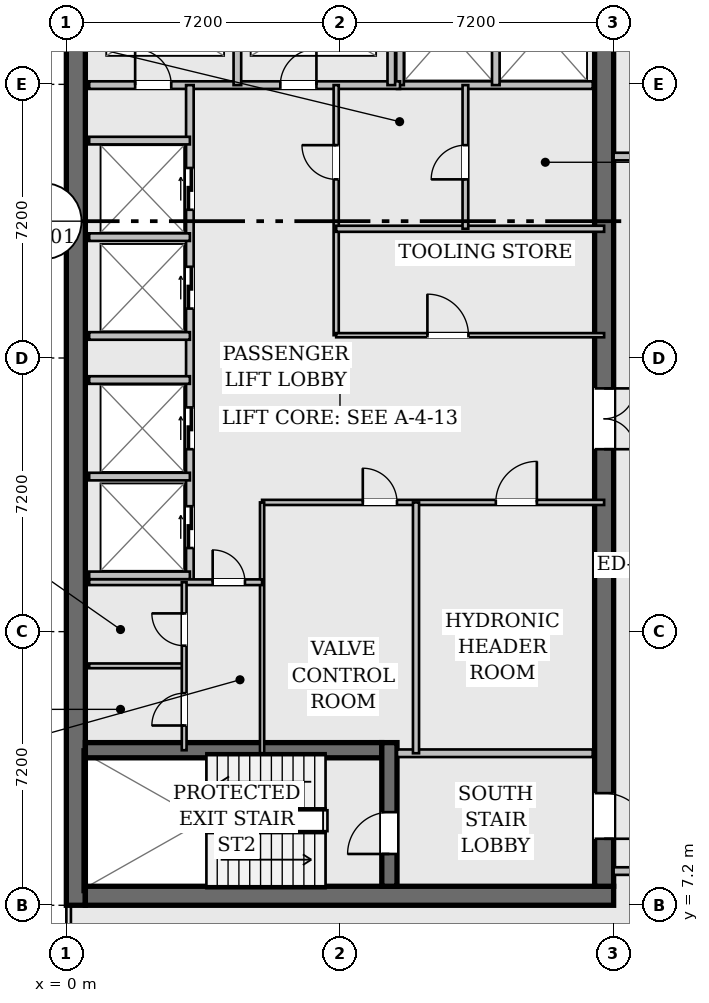
"""IFC4 building model, lengths in metres.
Left out: names, types, materials, properties, quantities, classifications, styles, units other than length and angle.
Written with IfcOpenShell. Run it as: python <this file> out.ifc"""

import sys

from ifc_helpers import new_model, si_unit, direction, frame, frame_2d, origin, place, context, subcontext, project, spatial, rectangle, extrude, element, fill, save


model = new_model("IFC4")
c1 = context("Model", 3, precision=1e-05, world=origin(), true_north=direction((0.0, 1.0)))
c2 = subcontext(c1, "Body", "Model", "MODEL_VIEW")
j1 = project(units=[si_unit("LENGTHUNIT", "METRE"), si_unit("PLANEANGLEUNIT", "RADIAN")], contexts=[c1])
p1 = place(None, origin())
s1 = spatial("IfcSite", under=j1, at=p1, CompositionType="ELEMENT")
p2 = place(p1, origin())
s2 = spatial("IfcBuilding", under=s1, at=p2, CompositionType="ELEMENT")
p3 = place(p2, frame((0.0, 0.0, 236.95)))
s3 = spatial("IfcBuildingStorey", under=s2, at=p3, CompositionType="ELEMENT", Elevation=236.95)
p4 = place(p3, frame((0.25, 7.2, 0.0), z_axis=(0.0, 0.0, 1.0), x_axis=(0.0, 1.0, 0.0)))
e1 = element("IfcWall", 1, at=p4, inside=s3, PredefinedType="SHEAR", context=c2, shape_type="SweptSolid", body=[
    extrude(rectangle(XDim=28.8, YDim=0.5, at=frame_2d((14.4, 0.0))), origin(), (0.0, 0.0, 1.0), 3.94),
])
p5 = place(p3, frame((0.5, 7.45, 0.0), z_axis=(0.0, 0.0, 1.0), x_axis=(1.0, 0.0, 0.0)))
e2 = element("IfcWall", 2, at=p5, inside=s3, PredefinedType="SHEAR", context=c2, shape_type="SweptSolid", body=[
    extrude(rectangle(XDim=13.9, YDim=0.5, at=frame_2d((6.95, 0.0))), origin(), (0.0, 0.0, 1.0), 3.94),
])
p6 = place(p3, frame((14.15, 35.5, 0.0), z_axis=(0.0, 0.0, 1.0), x_axis=(0.0, -1.0, 0.0)))
e3 = element("IfcWall", 3, at=p6, inside=s3, PredefinedType="SHEAR", context=c2, shape_type="SweptSolid", body=[
    extrude(rectangle(XDim=27.8, YDim=0.5, at=frame_2d((13.9, 0.0))), origin(), (0.0, 0.0, 1.0), 3.94),
])
p7 = place(p6, frame((1.4, 0.0, 0.0)))
e4 = element("IfcOpeningElement", 4, at=p7, cuts=e3, PredefinedType="OPENING", context=c2, shape_type="SweptSolid", body=[
    extrude(rectangle(XDim=1.2, YDim=2.15, at=frame_2d((0.6, 1.075))), frame((0.0, 0.262, 0.0), z_axis=(0.0, -1.0, 0.0), x_axis=(1.0, 0.0, 0.0)), (0.0, 0.0, 1.0), 0.524),
])
p8 = place(p6, frame((25.35, 0.0, 0.0)))
e5 = element("IfcOpeningElement", 5, at=p8, cuts=e3, PredefinedType="OPENING", context=c2, shape_type="SweptSolid", body=[
    extrude(rectangle(XDim=1.2, YDim=2.15, at=frame_2d((0.6, 1.075))), frame((0.0, 0.262, 0.0), z_axis=(0.0, -1.0, 0.0), x_axis=(1.0, 0.0, 0.0)), (0.0, 0.0, 1.0), 0.524),
])
p9 = place(p6, frame((14.7, 0.0, 0.0)))
e6 = element("IfcOpeningElement", 6, at=p9, cuts=e3, PredefinedType="OPENING", context=c2, shape_type="SweptSolid", body=[
    extrude(rectangle(XDim=1.6, YDim=2.2, at=frame_2d((0.8, 1.1))), frame((0.0, 0.262, 0.0), z_axis=(0.0, -1.0, 0.0), x_axis=(1.0, 0.0, 0.0)), (0.0, 0.0, 1.0), 0.524),
])
p10 = place(p3, frame((0.5, 11.28, 0.0), z_axis=(0.0, 0.0, 1.0), x_axis=(1.0, 0.0, 0.0)))
e7 = element("IfcWall", 7, at=p10, inside=s3, PredefinedType="SHEAR", context=c2, shape_type="SweptSolid", body=[
    extrude(rectangle(XDim=7.8, YDim=0.4, at=frame_2d((3.9, 0.0))), origin(), (0.0, 0.0, 1.0), 3.94),
])
p11 = place(p3, frame((8.5, 7.7, 0.0), z_axis=(0.0, 0.0, 1.0), x_axis=(0.0, 1.0, 0.0)))
e8 = element("IfcWall", 8, at=p11, inside=s3, PredefinedType="SHEAR", context=c2, shape_type="SweptSolid", body=[
    extrude(rectangle(XDim=3.78, YDim=0.4, at=frame_2d((1.89, 0.0))), origin(), (0.0, 0.0, 1.0), 3.94),
])
p12 = place(p11, frame((0.85, 0.0, 0.0)))
e9 = element("IfcOpeningElement", 9, at=p12, cuts=e8, PredefinedType="OPENING", context=c2, shape_type="SweptSolid", body=[
    extrude(rectangle(XDim=1.1, YDim=2.15, at=frame_2d((0.55, 1.075))), frame((0.0, 0.212, 0.0), z_axis=(0.0, -1.0, 0.0), x_axis=(1.0, 0.0, 0.0)), (0.0, 0.0, 1.0), 0.424),
])
for number, where, z_axis, x_axis in (
    (10, (8.7, 11.2, 0.0), (0.0, 0.0, 1.0), (1.0, 0.0, 0.0)),
    (11, (8.7, 28.78, 0.0), (0.0, 0.0, 1.0), (1.0, 0.0, 0.0)),
):
    element("IfcWall", number, at=place(p3, frame(where, z_axis=z_axis, x_axis=x_axis)), inside=s3, PredefinedType="PARTITIONING", context=c2, shape_type="SweptSolid", body=[
        extrude(rectangle(XDim=5.15, YDim=0.2, at=frame_2d((2.575, 0.0))), origin(), (0.0, 0.0, 1.0), 3.94),
    ])
for number, where, z_axis, x_axis in (
    (12, (8.78, 28.78, 0.0), (0.0, 0.0, 1.0), (0.0, 1.0, 0.0)),
    (13, (11.3, 28.78, 0.0), (0.0, 0.0, 1.0), (0.0, 1.0, 0.0)),
):
    element("IfcWall", number, at=place(p3, frame(where, z_axis=z_axis, x_axis=x_axis)), inside=s3, PredefinedType="PARTITIONING", context=c2, shape_type="SweptSolid", body=[
        extrude(rectangle(XDim=3.1, YDim=0.2, at=frame_2d((1.55, 0.0))), origin(), (0.0, 0.0, 1.0), 3.94),
    ])
p13 = place(p3, frame((0.6, 28.78, 0.0), z_axis=(0.0, 0.0, 1.0), x_axis=(1.0, 0.0, 0.0)))
e14 = element("IfcWall", 14, at=p13, inside=s3, PredefinedType="PARTITIONING", context=c2, shape_type="SweptSolid", body=[
    extrude(rectangle(XDim=8.18, YDim=0.2, at=frame_2d((4.09, 0.0))), origin(), (0.0, 0.0, 1.0), 3.94),
])
p14 = place(p13, frame((1.21, 0.0, 0.0)))
e15 = element("IfcOpeningElement", 15, at=p14, cuts=e14, PredefinedType="OPENING", context=c2, shape_type="SweptSolid", body=[
    extrude(rectangle(XDim=0.95, YDim=2.15, at=frame_2d((0.475, 1.075))), frame((0.0, 0.112, 0.0), z_axis=(0.0, -1.0, 0.0), x_axis=(1.0, 0.0, 0.0)), (0.0, 0.0, 1.0), 0.224),
])
p15 = place(p13, frame((5.03, 0.0, 0.0)))
e16 = element("IfcOpeningElement", 16, at=p15, cuts=e14, PredefinedType="OPENING", context=c2, shape_type="SweptSolid", body=[
    extrude(rectangle(XDim=0.95, YDim=2.15, at=frame_2d((0.475, 1.075))), frame((0.0, 0.112, 0.0), z_axis=(0.0, -1.0, 0.0), x_axis=(1.0, 0.0, 0.0)), (0.0, 0.0, 1.0), 0.224),
])
for number, where, z_axis, x_axis in (
    (17, (4.5, 28.78, 0.0), (0.0, 0.0, 1.0), (0.0, 1.0, 0.0)),
    (18, (8.55, 28.78, 0.0), (0.0, 0.0, 1.0), (0.0, 1.0, 0.0)),
):
    element("IfcWall", number, at=place(p3, frame(where, z_axis=z_axis, x_axis=x_axis)), inside=s3, PredefinedType="PARTITIONING", context=c2, shape_type="SweptSolid", body=[
        extrude(rectangle(XDim=2.94, YDim=0.2, at=frame_2d((1.47, 0.0))), origin(), (0.0, 0.0, 1.0), 3.94),
    ])
p16 = place(p3, frame((3.25, 15.7, 0.0), z_axis=(0.0, 0.0, 1.0), x_axis=(0.0, 1.0, 0.0)))
e19 = element("IfcWall", 19, at=p16, inside=s3, PredefinedType="PARTITIONING", context=c2, shape_type="SweptSolid", body=[
    extrude(rectangle(XDim=13.08, YDim=0.2, at=frame_2d((6.54, 0.0))), origin(), (0.0, 0.0, 1.0), 3.94),
])
p17 = place(p16, frame((0.9, 0.0, 0.0)))
e20 = element("IfcOpeningElement", 20, at=p17, cuts=e19, PredefinedType="OPENING", context=c2, shape_type="SweptSolid", body=[
    extrude(rectangle(XDim=1.1, YDim=2.2, at=frame_2d((0.55, 1.1))), frame((0.0, 0.112, 0.0), z_axis=(0.0, -1.0, 0.0), x_axis=(1.0, 0.0, 0.0)), (0.0, 0.0, 1.0), 0.224),
])
p18 = place(p16, frame((3.5, 0.0, 0.0)))
e21 = element("IfcOpeningElement", 21, at=p18, cuts=e19, PredefinedType="OPENING", context=c2, shape_type="SweptSolid", body=[
    extrude(rectangle(XDim=1.1, YDim=2.2, at=frame_2d((0.55, 1.1))), frame((0.0, 0.112, 0.0), z_axis=(0.0, -1.0, 0.0), x_axis=(1.0, 0.0, 0.0)), (0.0, 0.0, 1.0), 0.224),
])
p19 = place(p16, frame((7.2, 0.0, 0.0)))
e22 = element("IfcOpeningElement", 22, at=p19, cuts=e19, PredefinedType="OPENING", context=c2, shape_type="SweptSolid", body=[
    extrude(rectangle(XDim=1.1, YDim=2.2, at=frame_2d((0.55, 1.1))), frame((0.0, 0.112, 0.0), z_axis=(0.0, -1.0, 0.0), x_axis=(1.0, 0.0, 0.0)), (0.0, 0.0, 1.0), 0.224),
])
p20 = place(p16, frame((9.8, 0.0, 0.0)))
e23 = element("IfcOpeningElement", 23, at=p20, cuts=e19, PredefinedType="OPENING", context=c2, shape_type="SweptSolid", body=[
    extrude(rectangle(XDim=1.1, YDim=2.2, at=frame_2d((0.55, 1.1))), frame((0.0, 0.112, 0.0), z_axis=(0.0, -1.0, 0.0), x_axis=(1.0, 0.0, 0.0)), (0.0, 0.0, 1.0), 0.224),
])
for number, where, z_axis, x_axis in (
    (24, (0.6, 15.88, 0.0), (0.0, 0.0, 1.0), (1.0, 0.0, 0.0)),
    (25, (0.6, 18.48, 0.0), (0.0, 0.0, 1.0), (1.0, 0.0, 0.0)),
    (26, (0.6, 22.18, 0.0), (0.0, 0.0, 1.0), (1.0, 0.0, 0.0)),
    (27, (0.6, 24.78, 0.0), (0.0, 0.0, 1.0), (1.0, 0.0, 0.0)),
    (28, (0.6, 21.02, 0.0), (0.0, 0.0, 1.0), (1.0, 0.0, 0.0)),
    (29, (0.6, 27.32, 0.0), (0.0, 0.0, 1.0), (1.0, 0.0, 0.0)),
):
    element("IfcWall", number, at=place(p3, frame(where, z_axis=z_axis, x_axis=x_axis)), inside=s3, PredefinedType="PARTITIONING", context=c2, shape_type="SweptSolid", body=[
        extrude(rectangle(XDim=2.65, YDim=0.2, at=frame_2d((1.325, 0.0))), origin(), (0.0, 0.0, 1.0), 3.94),
    ])
p21 = place(p3, frame((7.1, 22.2, 0.0), z_axis=(0.0, 0.0, 1.0), x_axis=(0.0, 1.0, 0.0)))
e30 = element("IfcWall", 30, at=p21, inside=s3, PredefinedType="PARTITIONING", context=c2, shape_type="SweptSolid", body=[
    extrude(rectangle(XDim=6.58, YDim=0.135, at=frame_2d((3.29, 0.0))), origin(), (0.0, 0.0, 1.0), 3.94),
])
p22 = place(p21, frame((4.1, 0.0, 0.0)))
e31 = element("IfcOpeningElement", 31, at=p22, cuts=e30, PredefinedType="OPENING", context=c2, shape_type="SweptSolid", body=[
    extrude(rectangle(XDim=0.9, YDim=2.15, at=frame_2d((0.45, 1.075))), frame((0.0, 0.08, 0.0), z_axis=(0.0, -1.0, 0.0), x_axis=(1.0, 0.0, 0.0)), (0.0, 0.0, 1.0), 0.159),
])
p23 = place(p3, frame((7.1, 22.2, 0.0), z_axis=(0.0, 0.0, 1.0), x_axis=(1.0, 0.0, 0.0)))
e32 = element("IfcWall", 32, at=p23, inside=s3, PredefinedType="PARTITIONING", context=c2, shape_type="SweptSolid", body=[
    extrude(rectangle(XDim=7.05, YDim=0.11, at=frame_2d((3.525, 0.0))), origin(), (0.0, 0.0, 1.0), 3.94),
])
p24 = place(p23, frame((2.4, 0.0, 0.0)))
e33 = element("IfcOpeningElement", 33, at=p24, cuts=e32, PredefinedType="OPENING", context=c2, shape_type="SweptSolid", body=[
    extrude(rectangle(XDim=1.08, YDim=2.15, at=frame_2d((0.54, 1.075))), frame((0.0, 0.067, 0.0), z_axis=(0.0, -1.0, 0.0), x_axis=(1.0, 0.0, 0.0)), (0.0, 0.0, 1.0), 0.134),
])
p25 = place(p3, frame((7.1, 25.0, 0.0), z_axis=(0.0, 0.0, 1.0), x_axis=(1.0, 0.0, 0.0)))
e34 = element("IfcWall", 34, at=p25, inside=s3, PredefinedType="PARTITIONING", context=c2, shape_type="SweptSolid", body=[
    extrude(rectangle(XDim=7.05, YDim=0.16, at=frame_2d((3.525, 0.0))), origin(), (0.0, 0.0, 1.0), 3.94),
])
p26 = place(p3, frame((10.5, 25.0, 0.0), z_axis=(0.0, 0.0, 1.0), x_axis=(0.0, 1.0, 0.0)))
e35 = element("IfcWall", 35, at=p26, inside=s3, PredefinedType="PARTITIONING", context=c2, shape_type="SweptSolid", body=[
    extrude(rectangle(XDim=3.78, YDim=0.15, at=frame_2d((1.89, 0.0))), origin(), (0.0, 0.0, 1.0), 3.94),
])
p27 = place(p26, frame((1.3, 0.0, 0.0)))
e36 = element("IfcOpeningElement", 36, at=p27, cuts=e35, PredefinedType="OPENING", context=c2, shape_type="SweptSolid", body=[
    extrude(rectangle(XDim=0.9, YDim=2.15, at=frame_2d((0.45, 1.075))), frame((0.0, 0.087, 0.0), z_axis=(0.0, -1.0, 0.0), x_axis=(1.0, 0.0, 0.0)), (0.0, 0.0, 1.0), 0.174),
])
p28 = place(p3, frame((5.15, 17.8, 0.0), z_axis=(0.0, 0.0, 1.0), x_axis=(1.0, 0.0, 0.0)))
e37 = element("IfcWall", 37, at=p28, inside=s3, PredefinedType="PARTITIONING", context=c2, shape_type="SweptSolid", body=[
    extrude(rectangle(XDim=9.0, YDim=0.135, at=frame_2d((4.5, 0.0))), origin(), (0.0, 0.0, 1.0), 3.94),
])
p29 = place(p28, frame((2.65, 0.0, 0.0)))
e38 = element("IfcOpeningElement", 38, at=p29, cuts=e37, PredefinedType="OPENING", context=c2, shape_type="SweptSolid", body=[
    extrude(rectangle(XDim=0.9, YDim=2.15, at=frame_2d((0.45, 1.075))), frame((0.0, 0.08, 0.0), z_axis=(0.0, -1.0, 0.0), x_axis=(1.0, 0.0, 0.0)), (0.0, 0.0, 1.0), 0.159),
])
p30 = place(p28, frame((6.15, 0.0, 0.0)))
e39 = element("IfcOpeningElement", 39, at=p30, cuts=e37, PredefinedType="OPENING", context=c2, shape_type="SweptSolid", body=[
    extrude(rectangle(XDim=1.08, YDim=2.15, at=frame_2d((0.54, 1.075))), frame((0.0, 0.08, 0.0), z_axis=(0.0, -1.0, 0.0), x_axis=(1.0, 0.0, 0.0)), (0.0, 0.0, 1.0), 0.159),
])
p31 = place(p3, frame((5.15, 11.2, 0.0), z_axis=(0.0, 0.0, 1.0), x_axis=(0.0, 1.0, 0.0)))
e40 = element("IfcWall", 40, at=p31, inside=s3, PredefinedType="PARTITIONING", context=c2, shape_type="SweptSolid", body=[
    extrude(rectangle(XDim=6.6, YDim=0.11, at=frame_2d((3.3, 0.0))), origin(), (0.0, 0.0, 1.0), 3.94),
])
p32 = place(p3, frame((9.2, 11.2, 0.0), z_axis=(0.0, 0.0, 1.0), x_axis=(0.0, 1.0, 0.0)))
e41 = element("IfcWall", 41, at=p32, inside=s3, PredefinedType="PARTITIONING", context=c2, shape_type="SweptSolid", body=[
    extrude(rectangle(XDim=6.6, YDim=0.16, at=frame_2d((3.3, 0.0))), origin(), (0.0, 0.0, 1.0), 3.94),
])
p33 = place(p3, frame((0.6, 15.7, 0.0), z_axis=(0.0, 0.0, 1.0), x_axis=(1.0, 0.0, 0.0)))
e42 = element("IfcWall", 42, at=p33, inside=s3, PredefinedType="PARTITIONING", context=c2, shape_type="SweptSolid", body=[
    extrude(rectangle(XDim=4.55, YDim=0.15, at=frame_2d((2.275, 0.0))), origin(), (0.0, 0.0, 1.0), 3.94),
])
p34 = place(p33, frame((3.25, 0.0, 0.0)))
e43 = element("IfcOpeningElement", 43, at=p34, cuts=e42, PredefinedType="OPENING", context=c2, shape_type="SweptSolid", body=[
    extrude(rectangle(XDim=0.85, YDim=2.15, at=frame_2d((0.425, 1.075))), frame((0.0, 0.087, 0.0), z_axis=(0.0, -1.0, 0.0), x_axis=(1.0, 0.0, 0.0)), (0.0, 0.0, 1.0), 0.174),
])
p35 = place(p3, frame((0.6, 13.5, 0.0), z_axis=(0.0, 0.0, 1.0), x_axis=(1.0, 0.0, 0.0)))
e44 = element("IfcWall", 44, at=p35, inside=s3, PredefinedType="PARTITIONING", context=c2, shape_type="SweptSolid", body=[
    extrude(rectangle(XDim=2.5, YDim=0.125, at=frame_2d((1.25, 0.0))), origin(), (0.0, 0.0, 1.0), 3.94),
])
p36 = place(p3, frame((3.1, 11.28, 0.0), z_axis=(0.0, 0.0, 1.0), x_axis=(0.0, 1.0, 0.0)))
e45 = element("IfcWall", 45, at=p36, inside=s3, PredefinedType="PARTITIONING", context=c2, shape_type="SweptSolid", body=[
    extrude(rectangle(XDim=4.42, YDim=0.125, at=frame_2d((2.21, 0.0))), origin(), (0.0, 0.0, 1.0), 3.94),
])
p37 = place(p36, frame((0.65, 0.0, 0.0)))
e46 = element("IfcOpeningElement", 46, at=p37, cuts=e45, PredefinedType="OPENING", context=c2, shape_type="SweptSolid", body=[
    extrude(rectangle(XDim=0.85, YDim=2.15, at=frame_2d((0.425, 1.075))), frame((0.0, 0.074, 0.0), z_axis=(0.0, -1.0, 0.0), x_axis=(1.0, 0.0, 0.0)), (0.0, 0.0, 1.0), 0.149),
])
p38 = place(p36, frame((2.75, 0.0, 0.0)))
e47 = element("IfcOpeningElement", 47, at=p38, cuts=e45, PredefinedType="OPENING", context=c2, shape_type="SweptSolid", body=[
    extrude(rectangle(XDim=0.85, YDim=2.15, at=frame_2d((0.425, 1.075))), frame((0.0, 0.074, 0.0), z_axis=(0.0, -1.0, 0.0), x_axis=(1.0, 0.0, 0.0)), (0.0, 0.0, 1.0), 0.149),
])
p39 = place(p3, frame((14.4, 26.9, 0.0), z_axis=(0.0, 0.0, 1.0), x_axis=(1.0, 0.0, 0.0)))
e48 = element("IfcWall", 48, at=p39, inside=s3, PredefinedType="PARTITIONING", context=c2, shape_type="SweptSolid", body=[
    extrude(rectangle(XDim=2.95, YDim=0.2, at=frame_2d((1.475, 0.0))), origin(), (0.0, 0.0, 1.0), 3.508),
])
p40 = place(p39, frame((0.95, 0.0, 0.0)))
e49 = element("IfcOpeningElement", 49, at=p40, cuts=e48, PredefinedType="OPENING", context=c2, shape_type="SweptSolid", body=[
    extrude(rectangle(XDim=1.1, YDim=2.15, at=frame_2d((0.55, 1.075))), frame((0.0, 0.112, 0.0), z_axis=(0.0, -1.0, 0.0), x_axis=(1.0, 0.0, 0.0)), (0.0, 0.0, 1.0), 0.224),
])
p41 = place(p3, frame((14.4, 8.1, 0.0), z_axis=(0.0, 0.0, 1.0), x_axis=(1.0, 0.0, 0.0)))
e50 = element("IfcWall", 50, at=p41, inside=s3, PredefinedType="PARTITIONING", context=c2, shape_type="SweptSolid", body=[
    extrude(rectangle(XDim=2.95, YDim=0.2, at=frame_2d((1.475, 0.0))), origin(), (0.0, 0.0, 1.0), 3.94),
])
p42 = place(p12, origin())
e51 = element("IfcDoor", 51, at=p42, inside=s3, OperationType="SINGLE_SWING_LEFT", PredefinedType="DOOR", context=c2, shape_type="SweptSolid", body=[
    extrude(rectangle(XDim=1.1, YDim=2.15, at=frame_2d((0.55, 1.075))), frame((0.0, 0.025, 0.0), z_axis=(0.0, -1.0, 0.0), x_axis=(1.0, 0.0, 0.0)), (0.0, 0.0, 1.0), 0.05),
])
fill(e9, e51)
p43 = place(p8, origin())
e52 = element("IfcDoor", 52, at=p43, inside=s3, OperationType="SINGLE_SWING_RIGHT", PredefinedType="DOOR", context=c2, shape_type="SweptSolid", body=[
    extrude(rectangle(XDim=1.2, YDim=2.15, at=frame_2d((0.6, 1.075))), frame((0.0, 0.025, 0.0), z_axis=(0.0, -1.0, 0.0), x_axis=(1.0, 0.0, 0.0)), (0.0, 0.0, 1.0), 0.05),
])
fill(e5, e52)
p44 = place(p14, origin())
e53 = element("IfcDoor", 53, at=p44, inside=s3, OperationType="SINGLE_SWING_LEFT", PredefinedType="DOOR", context=c2, shape_type="SweptSolid", body=[
    extrude(rectangle(XDim=0.95, YDim=2.15, at=frame_2d((0.475, 1.075))), frame((0.0, 0.025, 0.0), z_axis=(0.0, -1.0, 0.0), x_axis=(1.0, 0.0, 0.0)), (0.0, 0.0, 1.0), 0.05),
])
fill(e15, e53)
p45 = place(p15, origin())
e54 = element("IfcDoor", 54, at=p45, inside=s3, OperationType="SINGLE_SWING_RIGHT", PredefinedType="DOOR", context=c2, shape_type="SweptSolid", body=[
    extrude(rectangle(XDim=0.95, YDim=2.15, at=frame_2d((0.475, 1.075))), frame((0.0, 0.025, 0.0), z_axis=(0.0, -1.0, 0.0), x_axis=(1.0, 0.0, 0.0)), (0.0, 0.0, 1.0), 0.05),
])
fill(e16, e54)
p46 = place(p9, origin())
e55 = element("IfcDoor", 55, at=p46, inside=s3, OperationType="DOUBLE_DOOR_SINGLE_SWING", PredefinedType="DOOR", context=c2, shape_type="SweptSolid", body=[
    extrude(rectangle(XDim=1.6, YDim=2.2, at=frame_2d((0.8, 1.1))), frame((0.0, 0.025, 0.0), z_axis=(0.0, -1.0, 0.0), x_axis=(1.0, 0.0, 0.0)), (0.0, 0.0, 1.0), 0.05),
])
fill(e6, e55)
p47 = place(p17, origin())
e56 = element("IfcDoor", 56, at=p47, inside=s3, OperationType="DOUBLE_DOOR_SLIDING", PredefinedType="DOOR", context=c2, shape_type="SweptSolid", body=[
    extrude(rectangle(XDim=1.1, YDim=2.2, at=frame_2d((0.55, 1.1))), frame((0.0, 0.025, 0.0), z_axis=(0.0, -1.0, 0.0), x_axis=(1.0, 0.0, 0.0)), (0.0, 0.0, 1.0), 0.05),
])
fill(e20, e56)
p48 = place(p18, origin())
e57 = element("IfcDoor", 57, at=p48, inside=s3, OperationType="DOUBLE_DOOR_SLIDING", PredefinedType="DOOR", context=c2, shape_type="SweptSolid", body=[
    extrude(rectangle(XDim=1.1, YDim=2.2, at=frame_2d((0.55, 1.1))), frame((0.0, 0.025, 0.0), z_axis=(0.0, -1.0, 0.0), x_axis=(1.0, 0.0, 0.0)), (0.0, 0.0, 1.0), 0.05),
])
fill(e21, e57)
p49 = place(p19, origin())
e58 = element("IfcDoor", 58, at=p49, inside=s3, OperationType="DOUBLE_DOOR_SLIDING", PredefinedType="DOOR", context=c2, shape_type="SweptSolid", body=[
    extrude(rectangle(XDim=1.1, YDim=2.2, at=frame_2d((0.55, 1.1))), frame((0.0, 0.025, 0.0), z_axis=(0.0, -1.0, 0.0), x_axis=(1.0, 0.0, 0.0)), (0.0, 0.0, 1.0), 0.05),
])
fill(e22, e58)
p50 = place(p20, origin())
e59 = element("IfcDoor", 59, at=p50, inside=s3, OperationType="DOUBLE_DOOR_SLIDING", PredefinedType="DOOR", context=c2, shape_type="SweptSolid", body=[
    extrude(rectangle(XDim=1.1, YDim=2.2, at=frame_2d((0.55, 1.1))), frame((0.0, 0.025, 0.0), z_axis=(0.0, -1.0, 0.0), x_axis=(1.0, 0.0, 0.0)), (0.0, 0.0, 1.0), 0.05),
])
fill(e23, e59)
p51 = place(p24, origin())
e60 = element("IfcDoor", 60, at=p51, inside=s3, OperationType="SINGLE_SWING_LEFT", PredefinedType="DOOR", context=c2, shape_type="SweptSolid", body=[
    extrude(rectangle(XDim=1.08, YDim=2.15, at=frame_2d((0.54, 1.075))), frame((0.0, 0.025, 0.0), z_axis=(0.0, -1.0, 0.0), x_axis=(1.0, 0.0, 0.0)), (0.0, 0.0, 1.0), 0.05),
])
fill(e33, e60)
p52 = place(p22, origin())
e61 = element("IfcDoor", 61, at=p52, inside=s3, OperationType="SINGLE_SWING_RIGHT", PredefinedType="DOOR", context=c2, shape_type="SweptSolid", body=[
    extrude(rectangle(XDim=0.9, YDim=2.15, at=frame_2d((0.45, 1.075))), frame((0.0, 0.025, 0.0), z_axis=(0.0, -1.0, 0.0), x_axis=(1.0, 0.0, 0.0)), (0.0, 0.0, 1.0), 0.05),
])
fill(e31, e61)
p53 = place(p27, origin())
e62 = element("IfcDoor", 62, at=p53, inside=s3, OperationType="SINGLE_SWING_LEFT", PredefinedType="DOOR", context=c2, shape_type="SweptSolid", body=[
    extrude(rectangle(XDim=0.9, YDim=2.15, at=frame_2d((0.45, 1.075))), frame((0.0, 0.025, 0.0), z_axis=(0.0, -1.0, 0.0), x_axis=(1.0, 0.0, 0.0)), (0.0, 0.0, 1.0), 0.05),
])
fill(e36, e62)
p54 = place(p29, origin())
e63 = element("IfcDoor", 63, at=p54, inside=s3, OperationType="SINGLE_SWING_LEFT", PredefinedType="DOOR", context=c2, shape_type="SweptSolid", body=[
    extrude(rectangle(XDim=0.9, YDim=2.15, at=frame_2d((0.45, 1.075))), frame((0.0, 0.025, 0.0), z_axis=(0.0, -1.0, 0.0), x_axis=(1.0, 0.0, 0.0)), (0.0, 0.0, 1.0), 0.05),
])
fill(e38, e63)
p55 = place(p30, origin())
e64 = element("IfcDoor", 64, at=p55, inside=s3, OperationType="SINGLE_SWING_RIGHT", PredefinedType="DOOR", context=c2, shape_type="SweptSolid", body=[
    extrude(rectangle(XDim=1.08, YDim=2.15, at=frame_2d((0.54, 1.075))), frame((0.0, 0.025, 0.0), z_axis=(0.0, -1.0, 0.0), x_axis=(1.0, 0.0, 0.0)), (0.0, 0.0, 1.0), 0.05),
])
fill(e39, e64)
p56 = place(p34, origin())
e65 = element("IfcDoor", 65, at=p56, inside=s3, OperationType="SINGLE_SWING_LEFT", PredefinedType="DOOR", context=c2, shape_type="SweptSolid", body=[
    extrude(rectangle(XDim=0.85, YDim=2.15, at=frame_2d((0.425, 1.075))), frame((0.0, 0.025, 0.0), z_axis=(0.0, -1.0, 0.0), x_axis=(1.0, 0.0, 0.0)), (0.0, 0.0, 1.0), 0.05),
])
fill(e43, e65)
p57 = place(p37, origin())
e66 = element("IfcDoor", 66, at=p57, inside=s3, OperationType="SINGLE_SWING_LEFT", PredefinedType="DOOR", context=c2, shape_type="SweptSolid", body=[
    extrude(rectangle(XDim=0.85, YDim=2.15, at=frame_2d((0.425, 1.075))), frame((0.0, 0.025, 0.0), z_axis=(0.0, -1.0, 0.0), x_axis=(1.0, 0.0, 0.0)), (0.0, 0.0, 1.0), 0.05),
])
fill(e46, e66)
p58 = place(p38, origin())
e67 = element("IfcDoor", 67, at=p58, inside=s3, OperationType="SINGLE_SWING_RIGHT", PredefinedType="DOOR", context=c2, shape_type="SweptSolid", body=[
    extrude(rectangle(XDim=0.85, YDim=2.15, at=frame_2d((0.425, 1.075))), frame((0.0, 0.025, 0.0), z_axis=(0.0, -1.0, 0.0), x_axis=(1.0, 0.0, 0.0)), (0.0, 0.0, 1.0), 0.05),
])
fill(e47, e67)
save(model, sys.argv[1])
